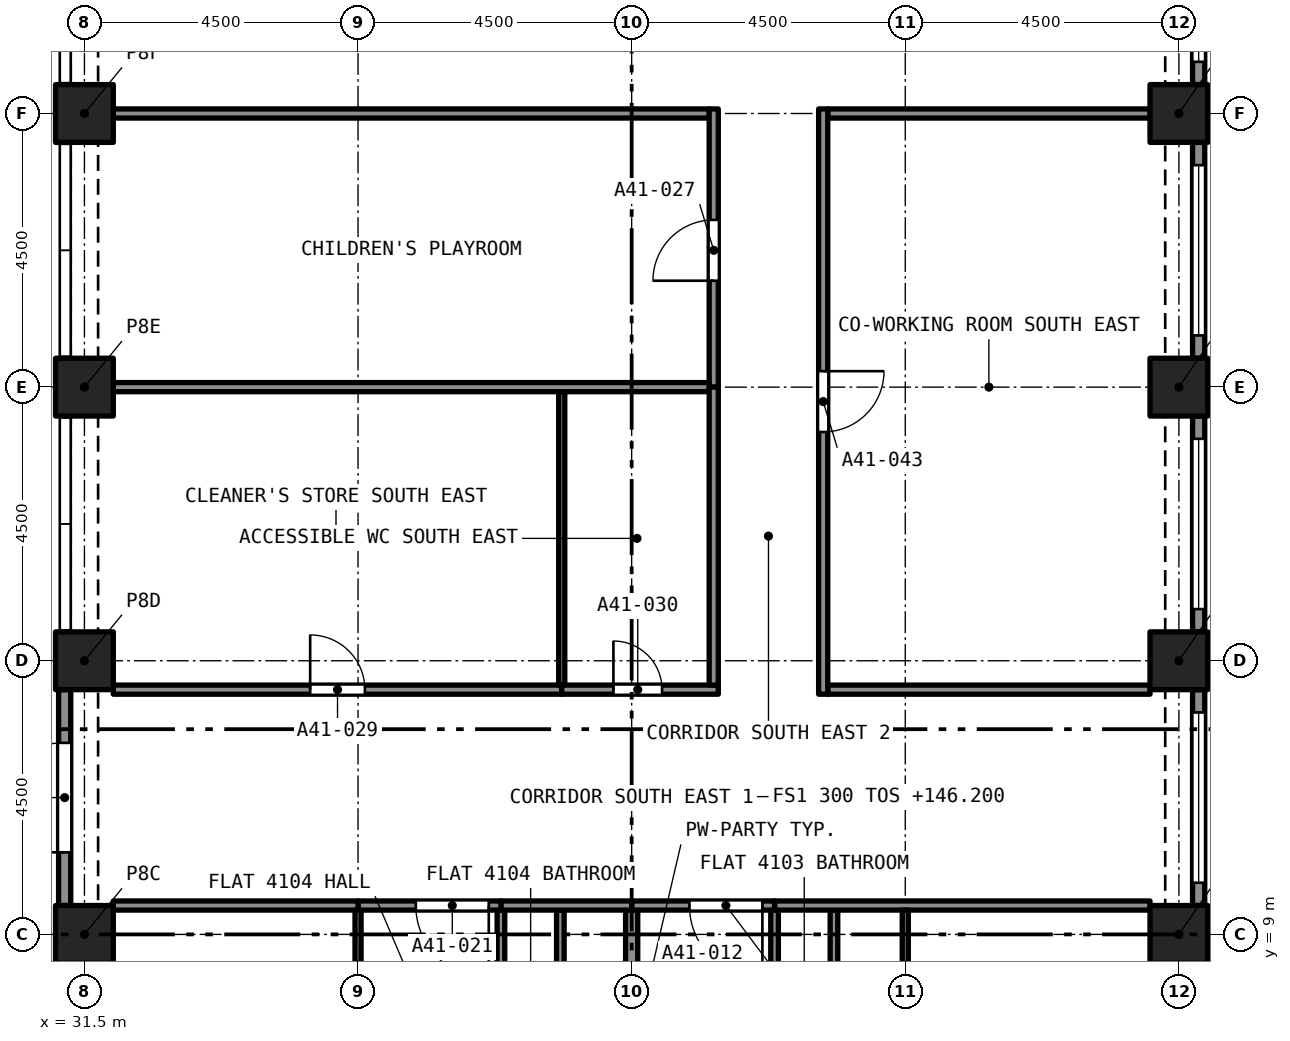
"""IFC4 building model, lengths in metres.
Left out: names, types, materials, properties, quantities, classifications, styles, units other than length and angle.
Written with IfcOpenShell. Run it as: python <this file> out.ifc"""

import sys

from ifc_helpers import new_model, si_unit, direction, frame, frame_2d, origin, origin_2d, place, context, subcontext, project, spatial, rectangle, extrude, element, fill, save


model = new_model("IFC4")
c1 = context("Model", 3, precision=1e-05, world=origin(), true_north=direction((0.0, 1.0)))
c2 = subcontext(c1, "Body", "Model", "MODEL_VIEW")
j1 = project(units=[si_unit("LENGTHUNIT", "METRE"), si_unit("PLANEANGLEUNIT", "RADIAN")], contexts=[c1])
p1 = place(None, origin())
s1 = spatial("IfcSite", under=j1, at=p1, CompositionType="ELEMENT")
p2 = place(p1, origin())
s2 = spatial("IfcBuilding", under=s1, at=p2, CompositionType="ELEMENT")
p3 = place(p2, frame((0.0, 0.0, 146.2)))
s3 = spatial("IfcBuildingStorey", under=s2, at=p3, CompositionType="ELEMENT", Elevation=146.2)
for number, where, z_axis, x_axis in (
    (1, (31.5, 9.0, 0.0), (0.0, 0.0, 1.0), (1.0, 0.0, 0.0)),
    (2, (49.5, 9.0, 0.0), (0.0, 0.0, 1.0), (1.0, 0.0, 0.0)),
    (3, (31.5, 13.5, 0.0), (0.0, 0.0, 1.0), (1.0, 0.0, 0.0)),
    (4, (49.5, 13.5, 0.0), (0.0, 0.0, 1.0), (1.0, 0.0, 0.0)),
    (5, (31.5, 18.0, 0.0), (0.0, 0.0, 1.0), (1.0, 0.0, 0.0)),
    (6, (49.5, 18.0, 0.0), (0.0, 0.0, 1.0), (1.0, 0.0, 0.0)),
    (7, (31.5, 22.5, 0.0), (0.0, 0.0, 1.0), (1.0, 0.0, 0.0)),
    (8, (49.5, 22.5, 0.0), (0.0, 0.0, 1.0), (1.0, 0.0, 0.0)),
):
    element("IfcColumn", number, at=place(p3, frame(where, z_axis=z_axis, x_axis=x_axis)), inside=s3, PredefinedType="COLUMN", context=c2, shape_type="SweptSolid", body=[
        extrude(rectangle(XDim=0.95, YDim=0.95, at=origin_2d()), origin(), (0.0, 0.0, 1.0), 4.4),
    ])
p4 = place(p3, frame((49.825, 13.025, 0.0), z_axis=(0.0, 0.0, 1.0), x_axis=(0.0, -1.0, 0.0)))
e9 = element("IfcWall", 9, at=p4, inside=s3, PredefinedType="SOLIDWALL", context=c2, shape_type="SweptSolid", body=[
    extrude(rectangle(XDim=3.55, YDim=0.2, at=frame_2d((1.775, 0.0))), origin(), (0.0, 0.0, 1.0), 4.4),
])
p5 = place(p4, frame((0.375, 0.0, 0.45)))
e10 = element("IfcOpeningElement", 10, at=p5, cuts=e9, PredefinedType="OPENING", context=c2, shape_type="SweptSolid", body=[
    extrude(rectangle(XDim=2.8, YDim=2.55, at=frame_2d((1.4, 1.275))), frame((0.0, 0.11, 0.0), z_axis=(0.0, -1.0, 0.0), x_axis=(1.0, 0.0, 0.0)), (0.0, 0.0, 1.0), 0.22),
])
p6 = place(p3, frame((49.825, 17.525, 0.0), z_axis=(0.0, 0.0, 1.0), x_axis=(0.0, -1.0, 0.0)))
e11 = element("IfcWall", 11, at=p6, inside=s3, PredefinedType="SOLIDWALL", context=c2, shape_type="SweptSolid", body=[
    extrude(rectangle(XDim=3.55, YDim=0.2, at=frame_2d((1.775, 0.0))), origin(), (0.0, 0.0, 1.0), 4.4),
])
p7 = place(p6, frame((0.375, 0.0, 0.45)))
e12 = element("IfcOpeningElement", 12, at=p7, cuts=e11, PredefinedType="OPENING", context=c2, shape_type="SweptSolid", body=[
    extrude(rectangle(XDim=2.8, YDim=2.55, at=frame_2d((1.4, 1.275))), frame((0.0, 0.11, 0.0), z_axis=(0.0, -1.0, 0.0), x_axis=(1.0, 0.0, 0.0)), (0.0, 0.0, 1.0), 0.22),
])
p8 = place(p3, frame((49.825, 22.025, 0.0), z_axis=(0.0, 0.0, 1.0), x_axis=(0.0, -1.0, 0.0)))
e13 = element("IfcWall", 13, at=p8, inside=s3, PredefinedType="SOLIDWALL", context=c2, shape_type="SweptSolid", body=[
    extrude(rectangle(XDim=3.55, YDim=0.2, at=frame_2d((1.775, 0.0))), origin(), (0.0, 0.0, 1.0), 4.4),
])
p9 = place(p8, frame((0.375, 0.0, 0.45)))
e14 = element("IfcOpeningElement", 14, at=p9, cuts=e13, PredefinedType="OPENING", context=c2, shape_type="SweptSolid", body=[
    extrude(rectangle(XDim=2.8, YDim=2.55, at=frame_2d((1.4, 1.275))), frame((0.0, 0.11, 0.0), z_axis=(0.0, -1.0, 0.0), x_axis=(1.0, 0.0, 0.0)), (0.0, 0.0, 1.0), 0.22),
])
p10 = place(p3, frame((49.825, 26.525, 0.0), z_axis=(0.0, 0.0, 1.0), x_axis=(0.0, -1.0, 0.0)))
e15 = element("IfcWall", 15, at=p10, inside=s3, PredefinedType="SOLIDWALL", context=c2, shape_type="SweptSolid", body=[
    extrude(rectangle(XDim=3.55, YDim=0.2, at=frame_2d((1.775, 0.0))), origin(), (0.0, 0.0, 1.0), 4.4),
])
p11 = place(p10, frame((0.375, 0.0, 0.45)))
e16 = element("IfcOpeningElement", 16, at=p11, cuts=e15, PredefinedType="OPENING", context=c2, shape_type="SweptSolid", body=[
    extrude(rectangle(XDim=2.8, YDim=2.55, at=frame_2d((1.4, 1.275))), frame((0.0, 0.11, 0.0), z_axis=(0.0, -1.0, 0.0), x_axis=(1.0, 0.0, 0.0)), (0.0, 0.0, 1.0), 0.22),
])
p12 = place(p3, frame((31.175, 9.475, 0.0), z_axis=(0.0, 0.0, 1.0), x_axis=(0.0, 1.0, 0.0)))
e17 = element("IfcWall", 17, at=p12, inside=s3, PredefinedType="SOLIDWALL", context=c2, shape_type="SweptSolid", body=[
    extrude(rectangle(XDim=3.55, YDim=0.2, at=frame_2d((1.775, 0.0))), origin(), (0.0, 0.0, 1.0), 4.4),
])
p13 = place(p12, frame((0.875, 0.0, 0.0)))
e18 = element("IfcOpeningElement", 18, at=p13, cuts=e17, PredefinedType="OPENING", context=c2, shape_type="SweptSolid", body=[
    extrude(rectangle(XDim=1.8, YDim=2.4, at=frame_2d((0.9, 1.2))), frame((0.0, 0.11, 0.0), z_axis=(0.0, -1.0, 0.0), x_axis=(1.0, 0.0, 0.0)), (0.0, 0.0, 1.0), 0.22),
])
p14 = place(p3, frame((42.85, 9.4, 0.0), z_axis=(0.0, 0.0, 1.0), x_axis=(0.0, -1.0, 0.0)))
e19 = element("IfcWall", 19, at=p14, inside=s3, PredefinedType="PARTITIONING", context=c2, shape_type="SweptSolid", body=[
    extrude(rectangle(XDim=3.367, YDim=0.125, at=frame_2d((1.684, 0.0))), origin(), (0.0, 0.0, 1.0), 4.1),
])
p15 = place(p14, frame((2.385, 0.0, 0.0)))
e20 = element("IfcOpeningElement", 20, at=p15, cuts=e19, PredefinedType="OPENING", context=c2, shape_type="SweptSolid", body=[
    extrude(rectangle(XDim=0.8, YDim=2.1, at=frame_2d((0.4, 1.05))), frame((0.0, 0.073, 0.0), z_axis=(0.0, -1.0, 0.0), x_axis=(1.0, 0.0, 0.0)), (0.0, 0.0, 1.0), 0.145),
])
p16 = place(p3, frame((43.827, 6.157, 0.0), z_axis=(0.0, 0.0, 1.0), x_axis=(0.0, 1.0, 0.0)))
e21 = element("IfcWall", 21, at=p16, inside=s3, PredefinedType="PARTITIONING", context=c2, shape_type="SweptSolid", body=[
    extrude(rectangle(XDim=3.242, YDim=0.125, at=frame_2d((1.621, 0.0))), origin(), (0.0, 0.0, 1.0), 4.1),
])
p17 = place(p3, frame((42.85, 9.475, 0.0), z_axis=(0.0, 0.0, 1.0), x_axis=(1.0, 0.0, 0.0)))
e22 = element("IfcWall", 22, at=p17, inside=s3, PredefinedType="PARTITIONING", context=c2, shape_type="SweptSolid", body=[
    extrude(rectangle(XDim=6.175, YDim=0.15, at=frame_2d((3.087, 0.0))), origin(), (0.0, 0.0, 1.0), 4.1),
])
p18 = place(p3, frame((40.5, 4.625, 0.0), z_axis=(0.0, 0.0, 1.0), x_axis=(0.0, 1.0, 0.0)))
e23 = element("IfcWall", 23, at=p18, inside=s3, PredefinedType="PARTITIONING", context=c2, shape_type="SweptSolid", body=[
    extrude(rectangle(XDim=4.775, YDim=0.2, at=frame_2d((2.387, 0.0))), origin(), (0.0, 0.0, 1.0), 4.1),
])
p19 = place(p3, frame((42.85, 9.475, 0.0), z_axis=(0.0, 0.0, 1.0), x_axis=(-1.0, 0.0, 0.0)))
e24 = element("IfcWall", 24, at=p19, inside=s3, PredefinedType="PARTITIONING", context=c2, shape_type="SweptSolid", body=[
    extrude(rectangle(XDim=2.35, YDim=0.15, at=frame_2d((1.175, 0.0))), origin(), (0.0, 0.0, 1.0), 4.1),
])
p20 = place(p19, frame((0.2, 0.0, 0.0)))
e25 = element("IfcOpeningElement", 25, at=p20, cuts=e24, PredefinedType="OPENING", context=c2, shape_type="SweptSolid", body=[
    extrude(rectangle(XDim=1.2, YDim=2.4, at=frame_2d((0.6, 1.2))), frame((0.0, 0.085, 0.0), z_axis=(0.0, -1.0, 0.0), x_axis=(1.0, 0.0, 0.0)), (0.0, 0.0, 1.0), 0.17),
])
p21 = place(p3, frame((45.0, 6.095, 0.0), z_axis=(0.0, 0.0, 1.0), x_axis=(0.0, 1.0, 0.0)))
e26 = element("IfcWall", 26, at=p21, inside=s3, PredefinedType="PARTITIONING", context=c2, shape_type="SweptSolid", body=[
    extrude(rectangle(XDim=3.305, YDim=0.1, at=frame_2d((1.652, 0.0))), origin(), (0.0, 0.0, 1.0), 4.1),
])
p22 = place(p3, frame((38.35, 9.4, 0.0), z_axis=(0.0, 0.0, 1.0), x_axis=(0.0, -1.0, 0.0)))
e27 = element("IfcWall", 27, at=p22, inside=s3, PredefinedType="PARTITIONING", context=c2, shape_type="SweptSolid", body=[
    extrude(rectangle(XDim=3.727, YDim=0.125, at=frame_2d((1.864, 0.0))), origin(), (0.0, 0.0, 1.0), 4.1),
])
p23 = place(p22, frame((2.745, 0.0, 0.0)))
e28 = element("IfcOpeningElement", 28, at=p23, cuts=e27, PredefinedType="OPENING", context=c2, shape_type="SweptSolid", body=[
    extrude(rectangle(XDim=0.8, YDim=2.1, at=frame_2d((0.4, 1.05))), frame((0.0, 0.073, 0.0), z_axis=(0.0, -1.0, 0.0), x_axis=(1.0, 0.0, 0.0)), (0.0, 0.0, 1.0), 0.145),
])
p24 = place(p3, frame((39.327, 5.798, 0.0), z_axis=(0.0, 0.0, 1.0), x_axis=(0.0, 1.0, 0.0)))
e29 = element("IfcWall", 29, at=p24, inside=s3, PredefinedType="PARTITIONING", context=c2, shape_type="SweptSolid", body=[
    extrude(rectangle(XDim=3.602, YDim=0.125, at=frame_2d((1.801, 0.0))), origin(), (0.0, 0.0, 1.0), 4.1),
])
p25 = place(p3, frame((38.35, 9.475, 0.0), z_axis=(0.0, 0.0, 1.0), x_axis=(1.0, 0.0, 0.0)))
e30 = element("IfcWall", 30, at=p25, inside=s3, PredefinedType="PARTITIONING", context=c2, shape_type="SweptSolid", body=[
    extrude(rectangle(XDim=2.15, YDim=0.15, at=frame_2d((1.075, 0.0))), origin(), (0.0, 0.0, 1.0), 4.1),
])
p26 = place(p3, frame((36.0, 4.435, 0.0), z_axis=(0.0, 0.0, 1.0), x_axis=(0.0, 1.0, 0.0)))
e31 = element("IfcWall", 31, at=p26, inside=s3, PredefinedType="PARTITIONING", context=c2, shape_type="SweptSolid", body=[
    extrude(rectangle(XDim=4.965, YDim=0.1, at=frame_2d((2.482, 0.0))), origin(), (0.0, 0.0, 1.0), 4.1),
])
p27 = place(p26, frame((0.15, 0.0, 0.0)))
e32 = element("IfcOpeningElement", 32, at=p27, cuts=e31, PredefinedType="OPENING", context=c2, shape_type="SweptSolid", body=[
    extrude(rectangle(XDim=1.0, YDim=2.1, at=frame_2d((0.5, 1.05))), frame((0.0, 0.06, 0.0), z_axis=(0.0, -1.0, 0.0), x_axis=(1.0, 0.0, 0.0)), (0.0, 0.0, 1.0), 0.12),
])
p28 = place(p3, frame((38.35, 9.475, 0.0), z_axis=(0.0, 0.0, 1.0), x_axis=(-1.0, 0.0, 0.0)))
e33 = element("IfcWall", 33, at=p28, inside=s3, PredefinedType="PARTITIONING", context=c2, shape_type="SweptSolid", body=[
    extrude(rectangle(XDim=2.35, YDim=0.15, at=frame_2d((1.175, 0.0))), origin(), (0.0, 0.0, 1.0), 4.1),
])
p29 = place(p28, frame((0.2, 0.0, 0.0)))
e34 = element("IfcOpeningElement", 34, at=p29, cuts=e33, PredefinedType="OPENING", context=c2, shape_type="SweptSolid", body=[
    extrude(rectangle(XDim=1.2, YDim=2.4, at=frame_2d((0.6, 1.2))), frame((0.0, 0.085, 0.0), z_axis=(0.0, -1.0, 0.0), x_axis=(1.0, 0.0, 0.0)), (0.0, 0.0, 1.0), 0.17),
])
p30 = place(p3, frame((31.975, 9.475, 0.0), z_axis=(0.0, 0.0, 1.0), x_axis=(1.0, 0.0, 0.0)))
e35 = element("IfcWall", 35, at=p30, inside=s3, PredefinedType="PARTITIONING", context=c2, shape_type="SweptSolid", body=[
    extrude(rectangle(XDim=4.025, YDim=0.15, at=frame_2d((2.012, 0.0))), origin(), (0.0, 0.0, 1.0), 4.1),
])
p31 = place(p3, frame((31.975, 22.5, 0.0), z_axis=(0.0, 0.0, 1.0), x_axis=(1.0, 0.0, 0.0)))
e36 = element("IfcWall", 36, at=p31, inside=s3, PredefinedType="PARTITIONING", context=c2, shape_type="SweptSolid", body=[
    extrude(rectangle(XDim=9.8, YDim=0.15, at=frame_2d((4.9, 0.0))), origin(), (0.0, 0.0, 1.0), 4.1),
])
p32 = place(p3, frame((41.85, 18.0, 0.0), z_axis=(0.0, 0.0, 1.0), x_axis=(0.0, 1.0, 0.0)))
e37 = element("IfcWall", 37, at=p32, inside=s3, PredefinedType="PARTITIONING", context=c2, shape_type="SweptSolid", body=[
    extrude(rectangle(XDim=4.575, YDim=0.15, at=frame_2d((2.288, 0.0))), origin(), (0.0, 0.0, 1.0), 4.1),
])
p33 = place(p32, frame((1.75, 0.0, 0.0)))
e38 = element("IfcOpeningElement", 38, at=p33, cuts=e37, PredefinedType="OPENING", context=c2, shape_type="SweptSolid", body=[
    extrude(rectangle(XDim=1.0, YDim=2.1, at=frame_2d((0.5, 1.05))), frame((0.0, 0.085, 0.0), z_axis=(0.0, -1.0, 0.0), x_axis=(1.0, 0.0, 0.0)), (0.0, 0.0, 1.0), 0.17),
])
p34 = place(p3, frame((31.975, 18.0, 0.0), z_axis=(0.0, 0.0, 1.0), x_axis=(1.0, 0.0, 0.0)))
e39 = element("IfcWall", 39, at=p34, inside=s3, PredefinedType="PARTITIONING", context=c2, shape_type="SweptSolid", body=[
    extrude(rectangle(XDim=9.8, YDim=0.15, at=frame_2d((4.9, 0.0))), origin(), (0.0, 0.0, 1.0), 4.1),
])
p35 = place(p3, frame((31.975, 13.025, 0.0), z_axis=(0.0, 0.0, 1.0), x_axis=(1.0, 0.0, 0.0)))
e40 = element("IfcWall", 40, at=p35, inside=s3, PredefinedType="PARTITIONING", context=c2, shape_type="SweptSolid", body=[
    extrude(rectangle(XDim=7.375, YDim=0.15, at=frame_2d((3.688, 0.0))), origin(), (0.0, 0.0, 1.0), 4.1),
])
p36 = place(p35, frame((3.238, 0.0, 0.0)))
e41 = element("IfcOpeningElement", 41, at=p36, cuts=e40, PredefinedType="OPENING", context=c2, shape_type="SweptSolid", body=[
    extrude(rectangle(XDim=0.9, YDim=2.1, at=frame_2d((0.45, 1.05))), frame((0.0, 0.085, 0.0), z_axis=(0.0, -1.0, 0.0), x_axis=(1.0, 0.0, 0.0)), (0.0, 0.0, 1.0), 0.17),
])
p37 = place(p3, frame((39.35, 13.025, 0.0), z_axis=(0.0, 0.0, 1.0), x_axis=(1.0, 0.0, 0.0)))
e42 = element("IfcWall", 42, at=p37, inside=s3, PredefinedType="PARTITIONING", context=c2, shape_type="SweptSolid", body=[
    extrude(rectangle(XDim=2.575, YDim=0.15, at=frame_2d((1.288, 0.0))), origin(), (0.0, 0.0, 1.0), 4.1),
])
p38 = place(p37, frame((0.85, 0.0, 0.0)))
e43 = element("IfcOpeningElement", 43, at=p38, cuts=e42, PredefinedType="OPENING", context=c2, shape_type="SweptSolid", body=[
    extrude(rectangle(XDim=0.8, YDim=2.1, at=frame_2d((0.4, 1.05))), frame((0.0, 0.085, 0.0), z_axis=(0.0, -1.0, 0.0), x_axis=(1.0, 0.0, 0.0)), (0.0, 0.0, 1.0), 0.17),
])
for number, where, z_axis, x_axis in (
    (44, (43.725, 13.025, 0.0), (0.0, 0.0, 1.0), (1.0, 0.0, 0.0)),
    (45, (43.725, 22.5, 0.0), (0.0, 0.0, 1.0), (1.0, 0.0, 0.0)),
):
    element("IfcWall", number, at=place(p3, frame(where, z_axis=z_axis, x_axis=x_axis)), inside=s3, PredefinedType="PARTITIONING", context=c2, shape_type="SweptSolid", body=[
        extrude(rectangle(XDim=5.3, YDim=0.15, at=frame_2d((2.65, 0.0))), origin(), (0.0, 0.0, 1.0), 4.1),
    ])
p39 = place(p3, frame((41.85, 13.1, 0.0), z_axis=(0.0, 0.0, 1.0), x_axis=(0.0, 1.0, 0.0)))
e46 = element("IfcWall", 46, at=p39, inside=s3, PredefinedType="PARTITIONING", context=c2, shape_type="SweptSolid", body=[
    extrude(rectangle(XDim=4.9, YDim=0.15, at=frame_2d((2.45, 0.0))), origin(), (0.0, 0.0, 1.0), 4.1),
])
p40 = place(p3, frame((43.65, 22.575, 0.0), z_axis=(0.0, 0.0, 1.0), x_axis=(0.0, -1.0, 0.0)))
e47 = element("IfcWall", 47, at=p40, inside=s3, PredefinedType="PARTITIONING", context=c2, shape_type="SweptSolid", body=[
    extrude(rectangle(XDim=9.625, YDim=0.15, at=frame_2d((4.812, 0.0))), origin(), (0.0, 0.0, 1.0), 4.1),
])
p41 = place(p40, frame((4.312, 0.0, 0.0)))
e48 = element("IfcOpeningElement", 48, at=p41, cuts=e47, PredefinedType="OPENING", context=c2, shape_type="SweptSolid", body=[
    extrude(rectangle(XDim=1.0, YDim=2.1, at=frame_2d((0.5, 1.05))), frame((0.0, 0.085, 0.0), z_axis=(0.0, -1.0, 0.0), x_axis=(1.0, 0.0, 0.0)), (0.0, 0.0, 1.0), 0.17),
])
p42 = place(p3, frame((39.35, 13.1, 0.0), z_axis=(0.0, 0.0, 1.0), x_axis=(0.0, 1.0, 0.0)))
e49 = element("IfcWall", 49, at=p42, inside=s3, PredefinedType="PARTITIONING", context=c2, shape_type="SweptSolid", body=[
    extrude(rectangle(XDim=4.825, YDim=0.1, at=frame_2d((2.413, 0.0))), origin(), (0.0, 0.0, 1.0), 4.1),
])
p43 = place(p5, origin())
e50 = element("IfcWindow", 50, at=p43, inside=s3, PartitioningType="SINGLE_PANEL", PredefinedType="WINDOW", context=c2, shape_type="SweptSolid", body=[
    extrude(rectangle(XDim=2.8, YDim=2.55, at=frame_2d((1.4, 1.275))), frame((0.0, 0.03, 0.0), z_axis=(0.0, -1.0, 0.0), x_axis=(1.0, 0.0, 0.0)), (0.0, 0.0, 1.0), 0.06),
])
fill(e10, e50)
p44 = place(p7, origin())
e51 = element("IfcWindow", 51, at=p44, inside=s3, PartitioningType="SINGLE_PANEL", PredefinedType="WINDOW", context=c2, shape_type="SweptSolid", body=[
    extrude(rectangle(XDim=2.8, YDim=2.55, at=frame_2d((1.4, 1.275))), frame((0.0, 0.03, 0.0), z_axis=(0.0, -1.0, 0.0), x_axis=(1.0, 0.0, 0.0)), (0.0, 0.0, 1.0), 0.06),
])
fill(e12, e51)
p45 = place(p9, origin())
e52 = element("IfcWindow", 52, at=p45, inside=s3, PartitioningType="SINGLE_PANEL", PredefinedType="WINDOW", context=c2, shape_type="SweptSolid", body=[
    extrude(rectangle(XDim=2.8, YDim=2.55, at=frame_2d((1.4, 1.275))), frame((0.0, 0.03, 0.0), z_axis=(0.0, -1.0, 0.0), x_axis=(1.0, 0.0, 0.0)), (0.0, 0.0, 1.0), 0.06),
])
fill(e14, e52)
p46 = place(p11, origin())
e53 = element("IfcWindow", 53, at=p46, inside=s3, PartitioningType="SINGLE_PANEL", PredefinedType="WINDOW", context=c2, shape_type="SweptSolid", body=[
    extrude(rectangle(XDim=2.8, YDim=2.55, at=frame_2d((1.4, 1.275))), frame((0.0, 0.03, 0.0), z_axis=(0.0, -1.0, 0.0), x_axis=(1.0, 0.0, 0.0)), (0.0, 0.0, 1.0), 0.06),
])
fill(e16, e53)
p47 = place(p13, origin())
e54 = element("IfcDoor", 54, at=p47, inside=s3, OperationType="DOUBLE_DOOR_SINGLE_SWING", PredefinedType="DOOR", context=c2, shape_type="SweptSolid", body=[
    extrude(rectangle(XDim=1.8, YDim=2.4, at=frame_2d((0.9, 1.2))), frame((0.0, 0.025, 0.0), z_axis=(0.0, -1.0, 0.0), x_axis=(1.0, 0.0, 0.0)), (0.0, 0.0, 1.0), 0.05),
])
fill(e18, e54)
p48 = place(p20, origin())
e55 = element("IfcDoor", 55, at=p48, inside=s3, OperationType="SINGLE_SWING_LEFT", PredefinedType="DOOR", context=c2, shape_type="SweptSolid", body=[
    extrude(rectangle(XDim=1.2, YDim=2.4, at=frame_2d((0.6, 1.2))), frame((0.0, 0.025, 0.0), z_axis=(0.0, -1.0, 0.0), x_axis=(1.0, 0.0, 0.0)), (0.0, 0.0, 1.0), 0.05),
])
fill(e25, e55)
p49 = place(p29, origin())
e56 = element("IfcDoor", 56, at=p49, inside=s3, OperationType="SINGLE_SWING_LEFT", PredefinedType="DOOR", context=c2, shape_type="SweptSolid", body=[
    extrude(rectangle(XDim=1.2, YDim=2.4, at=frame_2d((0.6, 1.2))), frame((0.0, 0.025, 0.0), z_axis=(0.0, -1.0, 0.0), x_axis=(1.0, 0.0, 0.0)), (0.0, 0.0, 1.0), 0.05),
])
fill(e34, e56)
p50 = place(p33, origin())
e57 = element("IfcDoor", 57, at=p50, inside=s3, OperationType="SINGLE_SWING_LEFT", PredefinedType="DOOR", context=c2, shape_type="SweptSolid", body=[
    extrude(rectangle(XDim=1.0, YDim=2.1, at=frame_2d((0.5, 1.05))), frame((0.0, 0.025, 0.0), z_axis=(0.0, -1.0, 0.0), x_axis=(1.0, 0.0, 0.0)), (0.0, 0.0, 1.0), 0.05),
])
fill(e38, e57)
p51 = place(p36, origin())
e58 = element("IfcDoor", 58, at=p51, inside=s3, OperationType="SINGLE_SWING_LEFT", PredefinedType="DOOR", context=c2, shape_type="SweptSolid", body=[
    extrude(rectangle(XDim=0.9, YDim=2.1, at=frame_2d((0.45, 1.05))), frame((0.0, 0.025, 0.0), z_axis=(0.0, -1.0, 0.0), x_axis=(1.0, 0.0, 0.0)), (0.0, 0.0, 1.0), 0.05),
])
fill(e41, e58)
p52 = place(p38, origin())
e59 = element("IfcDoor", 59, at=p52, inside=s3, OperationType="SINGLE_SWING_LEFT", PredefinedType="DOOR", context=c2, shape_type="SweptSolid", body=[
    extrude(rectangle(XDim=0.8, YDim=2.1, at=frame_2d((0.4, 1.05))), frame((0.0, 0.025, 0.0), z_axis=(0.0, -1.0, 0.0), x_axis=(1.0, 0.0, 0.0)), (0.0, 0.0, 1.0), 0.05),
])
fill(e43, e59)
p53 = place(p41, origin())
e60 = element("IfcDoor", 60, at=p53, inside=s3, OperationType="SINGLE_SWING_RIGHT", PredefinedType="DOOR", context=c2, shape_type="SweptSolid", body=[
    extrude(rectangle(XDim=1.0, YDim=2.1, at=frame_2d((0.5, 1.05))), frame((0.0, 0.025, 0.0), z_axis=(0.0, -1.0, 0.0), x_axis=(1.0, 0.0, 0.0)), (0.0, 0.0, 1.0), 0.05),
])
fill(e48, e60)
save(model, sys.argv[1])
